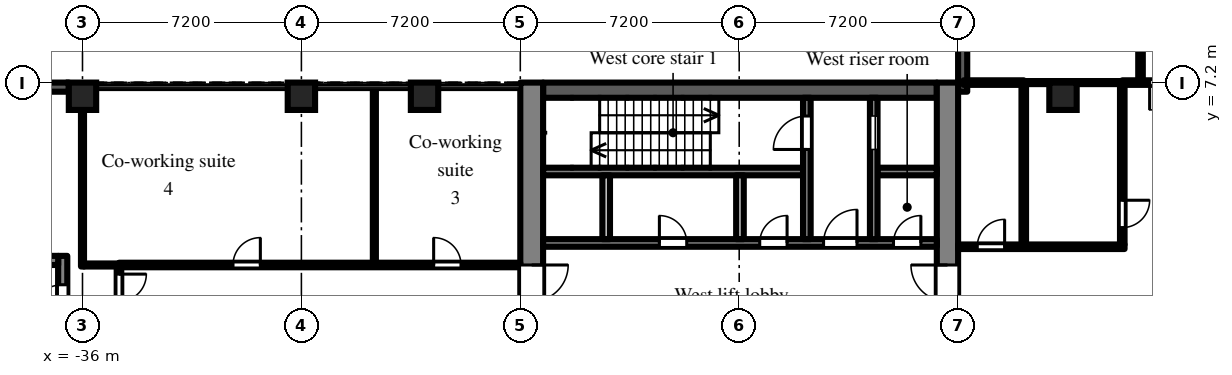
"""IFC4 building model, lengths in metres.
Left out: names, types, materials, properties, quantities, classifications, styles, units other than length and angle.
Written with IfcOpenShell. Run it as: python <this file> out.ifc"""

import sys

from ifc_helpers import new_model, si_unit, direction, frame, frame_2d, origin, origin_2d, place, context, subcontext, project, spatial, rectangle, extrude, element, fill, save


model = new_model("IFC4")
c1 = context("Model", 3, precision=1e-05, world=origin(), true_north=direction((0.0, 1.0)))
c2 = subcontext(c1, "Body", "Model", "MODEL_VIEW")
j1 = project(units=[si_unit("LENGTHUNIT", "METRE"), si_unit("PLANEANGLEUNIT", "RADIAN")], contexts=[c1])
p1 = place(None, origin())
s1 = spatial("IfcSite", under=j1, at=p1, CompositionType="ELEMENT")
p2 = place(p1, origin())
s2 = spatial("IfcBuilding", under=s1, at=p2, CompositionType="ELEMENT")
p3 = place(p2, frame((0.0, 0.0, 7.2)))
s3 = spatial("IfcBuildingStorey", under=s2, at=p3, CompositionType="ELEMENT", Elevation=7.2)
for number, where, z_axis, x_axis in (
    (1, (-36.0, 6.75, 0.0), (0.0, 0.0, 1.0), (1.0, 0.0, 0.0)),
    (2, (-28.8, 6.75, 0.0), (0.0, 0.0, 1.0), (1.0, 0.0, 0.0)),
    (3, (-24.75, 6.75, 0.0), (0.0, 0.0, 1.0), (1.0, 0.0, 0.0)),
    (4, (-3.75, 6.75, 0.0), (0.0, 0.0, 1.0), (1.0, 0.0, 0.0)),
):
    element("IfcColumn", number, at=place(p3, frame(where, z_axis=z_axis, x_axis=x_axis)), inside=s3, PredefinedType="COLUMN", context=c2, shape_type="SweptSolid", body=[
        extrude(rectangle(XDim=0.9, YDim=0.9, at=origin_2d()), origin(), (0.0, 0.0, 1.0), 4.5),
    ])
p4 = place(p3, frame((-7.05, 14.4, 0.0), z_axis=(0.0, 0.0, 1.0), x_axis=(0.0, -1.0, 0.0)))
e5 = element("IfcWall", 5, at=p4, inside=s3, PredefinedType="SOLIDWALL", context=c2, shape_type="SweptSolid", body=[
    extrude(rectangle(XDim=7.5, YDim=0.3, at=frame_2d((3.75, 0.0))), origin(), (0.0, 0.0, 1.0), 4.075),
])
p5 = place(p4, frame((0.15, 0.0, 0.0)))
e6 = element("IfcOpeningElement", 6, at=p5, cuts=e5, PredefinedType="OPENING", context=c2, shape_type="SweptSolid", body=[
    extrude(rectangle(XDim=1.3, YDim=2.1, at=frame_2d((0.65, 1.05))), frame((0.0, 0.16, 0.0), z_axis=(0.0, -1.0, 0.0), x_axis=(1.0, 0.0, 0.0)), (0.0, 0.0, 1.0), 0.32),
])
p6 = place(p3, frame((-36.45, 7.05, 0.0), z_axis=(0.0, 0.0, 1.0), x_axis=(-1.0, 0.0, 0.0)))
e7 = element("IfcWall", 7, at=p6, inside=s3, PredefinedType="SOLIDWALL", context=c2, shape_type="SweptSolid", body=[
    extrude(rectangle(XDim=2.25, YDim=0.3, at=frame_2d((1.125, 0.0))), origin(), (0.0, 0.0, 1.0), 3.6),
])
p7 = place(p3, frame((-7.55, -7.2, 0.0), z_axis=(0.0, 0.0, 1.0), x_axis=(0.0, 1.0, 0.0)))
e8 = element("IfcWall", 8, at=p7, inside=s3, PredefinedType="SHEAR", context=c2, shape_type="SweptSolid", body=[
    extrude(rectangle(XDim=14.4, YDim=0.7, at=frame_2d((7.2, 0.0))), origin(), (0.0, 0.0, 1.0), 4.075),
])
p8 = place(p7, frame((6.0, 0.0, 0.0)))
e9 = element("IfcOpeningElement", 9, at=p8, cuts=e8, PredefinedType="OPENING", context=c2, shape_type="SweptSolid", body=[
    extrude(rectangle(XDim=2.4, YDim=2.2, at=frame_2d((1.2, 1.1))), frame((0.0, 0.36, 0.0), z_axis=(0.0, -1.0, 0.0), x_axis=(1.0, 0.0, 0.0)), (0.0, 0.0, 1.0), 0.72),
])
p9 = place(p3, frame((-21.225, -7.2, 0.0), z_axis=(0.0, 0.0, 1.0), x_axis=(0.0, 1.0, 0.0)))
e10 = element("IfcWall", 10, at=p9, inside=s3, PredefinedType="SHEAR", context=c2, shape_type="SweptSolid", body=[
    extrude(rectangle(XDim=14.4, YDim=0.75, at=frame_2d((7.2, 0.0))), origin(), (0.0, 0.0, 1.0), 4.075),
])
p10 = place(p9, frame((6.0, 0.0, 0.0)))
e11 = element("IfcOpeningElement", 11, at=p10, cuts=e10, PredefinedType="OPENING", context=c2, shape_type="SweptSolid", body=[
    extrude(rectangle(XDim=2.4, YDim=2.2, at=frame_2d((1.2, 1.1))), frame((0.0, 0.385, 0.0), z_axis=(0.0, -1.0, 0.0), x_axis=(1.0, 0.0, 0.0)), (0.0, 0.0, 1.0), 0.77),
])
p11 = place(p3, frame((-7.9, 6.95, 0.0), z_axis=(0.0, 0.0, 1.0), x_axis=(-1.0, 0.0, 0.0)))
e12 = element("IfcWall", 12, at=p11, inside=s3, PredefinedType="SHEAR", context=c2, shape_type="SweptSolid", body=[
    extrude(rectangle(XDim=12.95, YDim=0.5, at=frame_2d((6.475, 0.0))), origin(), (0.0, 0.0, 1.0), 4.075),
])
p12 = place(p3, frame((-7.9, 1.925, 0.0), z_axis=(0.0, 0.0, 1.0), x_axis=(-1.0, 0.0, 0.0)))
e13 = element("IfcWall", 13, at=p12, inside=s3, PredefinedType="SHEAR", context=c2, shape_type="SweptSolid", body=[
    extrude(rectangle(XDim=12.95, YDim=0.25, at=frame_2d((6.475, 0.0))), origin(), (0.0, 0.0, 1.0), 4.075),
])
p13 = place(p12, frame((0.525, 0.0, 0.0)))
e14 = element("IfcOpeningElement", 14, at=p13, cuts=e13, PredefinedType="OPENING", context=c2, shape_type="SweptSolid", body=[
    extrude(rectangle(XDim=0.9, YDim=2.1, at=frame_2d((0.45, 1.05))), frame((0.0, 0.135, 0.0), z_axis=(0.0, -1.0, 0.0), x_axis=(1.0, 0.0, 0.0)), (0.0, 0.0, 1.0), 0.27),
])
p14 = place(p12, frame((2.625, 0.0, 0.0)))
e15 = element("IfcOpeningElement", 15, at=p14, cuts=e13, PredefinedType="OPENING", context=c2, shape_type="SweptSolid", body=[
    extrude(rectangle(XDim=1.1, YDim=2.1, at=frame_2d((0.55, 1.05))), frame((0.0, 0.135, 0.0), z_axis=(0.0, -1.0, 0.0), x_axis=(1.0, 0.0, 0.0)), (0.0, 0.0, 1.0), 0.27),
])
p15 = place(p12, frame((4.925, 0.0, 0.0)))
e16 = element("IfcOpeningElement", 16, at=p15, cuts=e13, PredefinedType="OPENING", context=c2, shape_type="SweptSolid", body=[
    extrude(rectangle(XDim=0.9, YDim=2.1, at=frame_2d((0.45, 1.05))), frame((0.0, 0.135, 0.0), z_axis=(0.0, -1.0, 0.0), x_axis=(1.0, 0.0, 0.0)), (0.0, 0.0, 1.0), 0.27),
])
p16 = place(p12, frame((8.225, 0.0, 0.0)))
e17 = element("IfcOpeningElement", 17, at=p16, cuts=e13, PredefinedType="OPENING", context=c2, shape_type="SweptSolid", body=[
    extrude(rectangle(XDim=0.9, YDim=2.1, at=frame_2d((0.45, 1.05))), frame((0.0, 0.135, 0.0), z_axis=(0.0, -1.0, 0.0), x_axis=(1.0, 0.0, 0.0)), (0.0, 0.0, 1.0), 0.27),
])
p17 = place(p3, frame((-7.9, 4.275, 0.0), z_axis=(0.0, 0.0, 1.0), x_axis=(-1.0, 0.0, 0.0)))
e18 = element("IfcWall", 18, at=p17, inside=s3, PredefinedType="SHEAR", context=c2, shape_type="SweptSolid", body=[
    extrude(rectangle(XDim=1.95, YDim=0.25, at=frame_2d((0.975, 0.0))), origin(), (0.0, 0.0, 1.0), 4.075),
])
p18 = place(p3, frame((-12.3, 4.275, 0.0), z_axis=(0.0, 0.0, 1.0), x_axis=(-1.0, 0.0, 0.0)))
e19 = element("IfcWall", 19, at=p18, inside=s3, PredefinedType="SHEAR", context=c2, shape_type="SweptSolid", body=[
    extrude(rectangle(XDim=8.55, YDim=0.25, at=frame_2d((4.275, 0.0))), origin(), (0.0, 0.0, 1.0), 4.075),
])
p19 = place(p3, frame((-9.975, 2.05, 0.0), z_axis=(0.0, 0.0, 1.0), x_axis=(0.0, 1.0, 0.0)))
e20 = element("IfcWall", 20, at=p19, inside=s3, PredefinedType="SHEAR", context=c2, shape_type="SweptSolid", body=[
    extrude(rectangle(XDim=4.65, YDim=0.25, at=frame_2d((2.325, 0.0))), origin(), (0.0, 0.0, 1.0), 4.075),
])
p20 = place(p19, frame((2.95, 0.0, 0.0)))
e21 = element("IfcOpeningElement", 21, at=p20, cuts=e20, PredefinedType="OPENING", context=c2, shape_type="SweptSolid", body=[
    extrude(rectangle(XDim=1.1, YDim=2.1, at=frame_2d((0.55, 1.05))), frame((0.0, 0.135, 0.0), z_axis=(0.0, -1.0, 0.0), x_axis=(1.0, 0.0, 0.0)), (0.0, 0.0, 1.0), 0.27),
])
p21 = place(p3, frame((-12.175, 2.05, 0.0), z_axis=(0.0, 0.0, 1.0), x_axis=(0.0, 1.0, 0.0)))
e22 = element("IfcWall", 22, at=p21, inside=s3, PredefinedType="SHEAR", context=c2, shape_type="SweptSolid", body=[
    extrude(rectangle(XDim=4.65, YDim=0.25, at=frame_2d((2.325, 0.0))), origin(), (0.0, 0.0, 1.0), 4.075),
])
p22 = place(p21, frame((2.95, 0.0, 0.0)))
e23 = element("IfcOpeningElement", 23, at=p22, cuts=e22, PredefinedType="OPENING", context=c2, shape_type="SweptSolid", body=[
    extrude(rectangle(XDim=1.1, YDim=2.1, at=frame_2d((0.55, 1.05))), frame((0.0, 0.135, 0.0), z_axis=(0.0, -1.0, 0.0), x_axis=(1.0, 0.0, 0.0)), (0.0, 0.0, 1.0), 0.27),
])
for number, where, z_axis, x_axis in (
    (24, (-14.375, 2.05, 0.0), (0.0, 0.0, 1.0), (0.0, 1.0, 0.0)),
    (25, (-18.775, 2.05, 0.0), (0.0, 0.0, 1.0), (0.0, 1.0, 0.0)),
):
    element("IfcWall", number, at=place(p3, frame(where, z_axis=z_axis, x_axis=x_axis)), inside=s3, PredefinedType="PARTITIONING", context=c2, shape_type="SweptSolid", body=[
        extrude(rectangle(XDim=2.1, YDim=0.25, at=frame_2d((1.05, 0.0))), origin(), (0.0, 0.0, 1.0), 4.075),
    ])
p23 = place(p3, frame((-36.65, -1.5, 0.0), z_axis=(0.0, 0.0, 1.0), x_axis=(0.0, 1.0, 0.0)))
e26 = element("IfcWall", 26, at=p23, inside=s3, PredefinedType="SHEAR", context=c2, shape_type="SweptSolid", body=[
    extrude(rectangle(XDim=3.0, YDim=0.3, at=frame_2d((1.5, 0.0))), origin(), (0.0, 0.0, 1.0), 4.075),
])
p24 = place(p23, frame((0.95, 0.0, 0.0)))
e27 = element("IfcOpeningElement", 27, at=p24, cuts=e26, PredefinedType="OPENING", context=c2, shape_type="SweptSolid", body=[
    extrude(rectangle(XDim=1.1, YDim=2.1, at=frame_2d((0.55, 1.05))), frame((0.0, 0.16, 0.0), z_axis=(0.0, -1.0, 0.0), x_axis=(1.0, 0.0, 0.0)), (0.0, 0.0, 1.0), 0.32),
])
p25 = place(p3, frame((-36.8, 1.35, 0.0), z_axis=(0.0, 0.0, 1.0), x_axis=(-1.0, 0.0, 0.0)))
e28 = element("IfcWall", 28, at=p25, inside=s3, PredefinedType="SHEAR", context=c2, shape_type="SweptSolid", body=[
    extrude(rectangle(XDim=5.8, YDim=0.3, at=frame_2d((2.9, 0.0))), origin(), (0.0, 0.0, 1.0), 4.075),
])
p26 = place(p3, frame((-36.0, 1.15, 0.0), z_axis=(0.0, 0.0, 1.0), x_axis=(0.0, 1.0, 0.0)))
e29 = element("IfcWall", 29, at=p26, inside=s3, PredefinedType="PARTITIONING", context=c2, shape_type="SweptSolid", body=[
    extrude(rectangle(XDim=5.75, YDim=0.1, at=frame_2d((2.875, 0.0))), origin(), (0.0, 0.0, 1.0), 4.075),
])
p27 = place(p3, frame((-35.95, 1.2, 0.0), z_axis=(0.0, 0.0, 1.0), x_axis=(1.0, 0.0, 0.0)))
e30 = element("IfcWall", 30, at=p27, inside=s3, PredefinedType="PARTITIONING", context=c2, shape_type="SweptSolid", body=[
    extrude(rectangle(XDim=1.15, YDim=0.1, at=frame_2d((0.575, 0.0))), origin(), (0.0, 0.0, 1.0), 4.075),
])
p28 = place(p3, frame((-34.8, -1.125, 0.0), z_axis=(0.0, 0.0, 1.0), x_axis=(0.0, 1.0, 0.0)))
e31 = element("IfcWall", 31, at=p28, inside=s3, PredefinedType="PARTITIONING", context=c2, shape_type="SweptSolid", body=[
    extrude(rectangle(XDim=2.25, YDim=0.15, at=frame_2d((1.125, 0.0))), origin(), (0.0, 0.0, 1.0), 4.075),
])
p29 = place(p28, frame((0.225, 0.0, 0.0)))
e32 = element("IfcOpeningElement", 32, at=p29, cuts=e31, PredefinedType="OPENING", context=c2, shape_type="SweptSolid", body=[
    extrude(rectangle(XDim=1.8, YDim=2.1, at=frame_2d((0.9, 1.05))), frame((0.0, 0.085, 0.0), z_axis=(0.0, -1.0, 0.0), x_axis=(1.0, 0.0, 0.0)), (0.0, 0.0, 1.0), 0.17),
])
p30 = place(p3, frame((-34.8, 1.2, 0.0), z_axis=(0.0, 0.0, 1.0), x_axis=(1.0, 0.0, 0.0)))
e33 = element("IfcWall", 33, at=p30, inside=s3, PredefinedType="PARTITIONING", context=c2, shape_type="SweptSolid", body=[
    extrude(rectangle(XDim=13.2, YDim=0.15, at=frame_2d((6.6, 0.0))), origin(), (0.0, 0.0, 1.0), 4.075),
])
p31 = place(p30, frame((10.35, 0.0, 0.0)))
e34 = element("IfcOpeningElement", 34, at=p31, cuts=e33, PredefinedType="OPENING", context=c2, shape_type="SweptSolid", body=[
    extrude(rectangle(XDim=0.9, YDim=2.1, at=frame_2d((0.45, 1.05))), frame((0.0, 0.085, 0.0), z_axis=(0.0, -1.0, 0.0), x_axis=(1.0, 0.0, 0.0)), (0.0, 0.0, 1.0), 0.17),
])
p32 = place(p30, frame((3.75, 0.0, 0.0)))
e35 = element("IfcOpeningElement", 35, at=p32, cuts=e33, PredefinedType="OPENING", context=c2, shape_type="SweptSolid", body=[
    extrude(rectangle(XDim=0.9, YDim=2.1, at=frame_2d((0.45, 1.05))), frame((0.0, 0.085, 0.0), z_axis=(0.0, -1.0, 0.0), x_axis=(1.0, 0.0, 0.0)), (0.0, 0.0, 1.0), 0.17),
])
p33 = place(p3, frame((-26.4, 1.275, 0.0), z_axis=(0.0, 0.0, 1.0), x_axis=(0.0, 1.0, 0.0)))
e36 = element("IfcWall", 36, at=p33, inside=s3, PredefinedType="PARTITIONING", context=c2, shape_type="SweptSolid", body=[
    extrude(rectangle(XDim=5.745, YDim=0.1, at=frame_2d((2.873, 0.0))), origin(), (0.0, 0.0, 1.0), 4.075),
])
p34 = place(p3, frame((-7.2, 1.8, 0.0), z_axis=(0.0, 0.0, 1.0), x_axis=(1.0, 0.0, 0.0)))
e37 = element("IfcWall", 37, at=p34, inside=s3, PredefinedType="PARTITIONING", context=c2, shape_type="SweptSolid", body=[
    extrude(rectangle(XDim=5.475, YDim=0.15, at=frame_2d((2.737, 0.0))), origin(), (0.0, 0.0, 1.0), 4.075),
])
p35 = place(p34, frame((0.63, 0.0, 0.0)))
e38 = element("IfcOpeningElement", 38, at=p35, cuts=e37, PredefinedType="OPENING", context=c2, shape_type="SweptSolid", body=[
    extrude(rectangle(XDim=0.9, YDim=2.1, at=frame_2d((0.45, 1.05))), frame((0.0, 0.085, 0.0), z_axis=(0.0, -1.0, 0.0), x_axis=(1.0, 0.0, 0.0)), (0.0, 0.0, 1.0), 0.17),
])
p36 = place(p3, frame((-7.02, 7.2, 0.0), z_axis=(0.0, 0.0, 1.0), x_axis=(1.0, 0.0, 0.0)))
e39 = element("IfcWall", 39, at=p36, inside=s3, PredefinedType="PARTITIONING", context=c2, shape_type="SweptSolid", body=[
    extrude(rectangle(XDim=1.98, YDim=0.15, at=frame_2d((0.99, 0.0))), origin(), (0.0, 0.0, 1.0), 3.6),
])
p37 = place(p3, frame((-5.04, 1.875, 0.0), z_axis=(0.0, 0.0, 1.0), x_axis=(0.0, 1.0, 0.0)))
e40 = element("IfcWall", 40, at=p37, inside=s3, PredefinedType="PARTITIONING", context=c2, shape_type="SweptSolid", body=[
    extrude(rectangle(XDim=5.25, YDim=0.15, at=frame_2d((2.625, 0.0))), origin(), (0.0, 0.0, 1.0), 4.075),
])
p38 = place(p3, frame((-5.04, 7.2, 0.0), z_axis=(0.0, 0.0, 1.0), x_axis=(1.0, 0.0, 0.0)))
e41 = element("IfcWall", 41, at=p38, inside=s3, PredefinedType="PARTITIONING", context=c2, shape_type="SweptSolid", body=[
    extrude(rectangle(XDim=1.29, YDim=0.1, at=frame_2d((0.645, 0.0))), origin(), (0.0, 0.0, 1.0), 3.6),
])
p39 = place(p3, frame((-1.8, 1.875, 0.0), z_axis=(0.0, 0.0, 1.0), x_axis=(0.0, 1.0, 0.0)))
e42 = element("IfcWall", 42, at=p39, inside=s3, PredefinedType="PARTITIONING", context=c2, shape_type="SweptSolid", body=[
    extrude(rectangle(XDim=5.25, YDim=0.15, at=frame_2d((2.625, 0.0))), origin(), (0.0, 0.0, 1.0), 4.075),
])
p40 = place(p39, frame((0.555, 0.0, 0.0)))
e43 = element("IfcOpeningElement", 43, at=p40, cuts=e42, PredefinedType="OPENING", context=c2, shape_type="SweptSolid", body=[
    extrude(rectangle(XDim=0.9, YDim=2.1, at=frame_2d((0.45, 1.05))), frame((0.0, 0.085, 0.0), z_axis=(0.0, -1.0, 0.0), x_axis=(1.0, 0.0, 0.0)), (0.0, 0.0, 1.0), 0.17),
])
p41 = place(p3, frame((-1.8, 7.2, 0.0), z_axis=(0.0, 0.0, 1.0), x_axis=(1.0, 0.0, 0.0)))
e44 = element("IfcWall", 44, at=p41, inside=s3, PredefinedType="PARTITIONING", context=c2, shape_type="SweptSolid", body=[
    extrude(rectangle(XDim=3.6, YDim=0.15, at=frame_2d((1.8, 0.0))), origin(), (0.0, 0.0, 1.0), 4.075),
])
p42 = place(p41, frame((0.9, 0.0, 0.0)))
e45 = element("IfcOpeningElement", 45, at=p42, cuts=e44, PredefinedType="OPENING", context=c2, shape_type="SweptSolid", body=[
    extrude(rectangle(XDim=1.8, YDim=2.1, at=frame_2d((0.9, 1.05))), frame((0.0, 0.085, 0.0), z_axis=(0.0, -1.0, 0.0), x_axis=(1.0, 0.0, 0.0)), (0.0, 0.0, 1.0), 0.17),
])
p43 = place(p3, frame((-1.2, 7.275, 0.0), z_axis=(0.0, 0.0, 1.0), x_axis=(0.0, 1.0, 0.0)))
e46 = element("IfcWall", 46, at=p43, inside=s3, PredefinedType="PARTITIONING", context=c2, shape_type="SweptSolid", body=[
    extrude(rectangle(XDim=29.225, YDim=0.15, at=frame_2d((14.613, 0.0))), origin(), (0.0, 0.0, 1.0), 4.075),
])
p44 = place(p43, frame((6.675, 0.0, 0.0)))
e47 = element("IfcOpeningElement", 47, at=p44, cuts=e46, PredefinedType="OPENING", context=c2, shape_type="SweptSolid", body=[
    extrude(rectangle(XDim=0.9, YDim=2.1, at=frame_2d((0.45, 1.05))), frame((0.0, 0.085, 0.0), z_axis=(0.0, -1.0, 0.0), x_axis=(1.0, 0.0, 0.0)), (0.0, 0.0, 1.0), 0.17),
])
p45 = place(p43, frame((18.675, 0.0, 0.0)))
e48 = element("IfcOpeningElement", 48, at=p45, cuts=e46, PredefinedType="OPENING", context=c2, shape_type="SweptSolid", body=[
    extrude(rectangle(XDim=0.9, YDim=2.1, at=frame_2d((0.45, 1.05))), frame((0.0, 0.085, 0.0), z_axis=(0.0, -1.0, 0.0), x_axis=(1.0, 0.0, 0.0)), (0.0, 0.0, 1.0), 0.17),
])
p46 = place(p43, frame((26.125, 0.0, 0.0)))
e49 = element("IfcOpeningElement", 49, at=p46, cuts=e46, PredefinedType="OPENING", context=c2, shape_type="SweptSolid", body=[
    extrude(rectangle(XDim=0.9, YDim=2.1, at=frame_2d((0.45, 1.05))), frame((0.0, 0.085, 0.0), z_axis=(0.0, -1.0, 0.0), x_axis=(1.0, 0.0, 0.0)), (0.0, 0.0, 1.0), 0.17),
])
p47 = place(p3, frame((-3.75, 7.2, 0.0), z_axis=(0.0, 0.0, 1.0), x_axis=(1.0, 0.0, 0.0)))
e50 = element("IfcWall", 50, at=p47, inside=s3, PredefinedType="PARTITIONING", context=c2, shape_type="SweptSolid", body=[
    extrude(rectangle(XDim=1.95, YDim=0.1, at=frame_2d((0.975, 0.0))), origin(), (0.0, 0.0, 1.0), 4.075),
])
p48 = place(p20, origin())
e51 = element("IfcDoor", 51, at=p48, inside=s3, OperationType="SLIDING_TO_LEFT", PredefinedType="DOOR", context=c2, shape_type="SweptSolid", body=[
    extrude(rectangle(XDim=1.1, YDim=2.1, at=frame_2d((0.55, 1.05))), frame((0.0, 0.025, 0.0), z_axis=(0.0, -1.0, 0.0), x_axis=(1.0, 0.0, 0.0)), (0.0, 0.0, 1.0), 0.05),
])
fill(e21, e51)
p49 = place(p22, origin())
e52 = element("IfcDoor", 52, at=p49, inside=s3, OperationType="SINGLE_SWING_LEFT", PredefinedType="DOOR", context=c2, shape_type="SweptSolid", body=[
    extrude(rectangle(XDim=1.1, YDim=2.1, at=frame_2d((0.55, 1.05))), frame((0.0, 0.025, 0.0), z_axis=(0.0, -1.0, 0.0), x_axis=(1.0, 0.0, 0.0)), (0.0, 0.0, 1.0), 0.05),
])
fill(e23, e52)
p50 = place(p13, frame((0.9, 0.0, 0.0), z_axis=(0.0, 0.0, 1.0), x_axis=(-1.0, 0.0, 0.0)))
e53 = element("IfcDoor", 53, at=p50, inside=s3, OperationType="SINGLE_SWING_RIGHT", PredefinedType="DOOR", context=c2, shape_type="SweptSolid", body=[
    extrude(rectangle(XDim=0.9, YDim=2.1, at=frame_2d((0.45, 1.05))), frame((0.0, 0.025, 0.0), z_axis=(0.0, -1.0, 0.0), x_axis=(1.0, 0.0, 0.0)), (0.0, 0.0, 1.0), 0.05),
])
fill(e14, e53)
p51 = place(p14, frame((1.1, 0.0, 0.0), z_axis=(0.0, 0.0, 1.0), x_axis=(-1.0, 0.0, 0.0)))
e54 = element("IfcDoor", 54, at=p51, inside=s3, OperationType="SINGLE_SWING_RIGHT", PredefinedType="DOOR", context=c2, shape_type="SweptSolid", body=[
    extrude(rectangle(XDim=1.1, YDim=2.1, at=frame_2d((0.55, 1.05))), frame((0.0, 0.025, 0.0), z_axis=(0.0, -1.0, 0.0), x_axis=(1.0, 0.0, 0.0)), (0.0, 0.0, 1.0), 0.05),
])
fill(e15, e54)
p52 = place(p8, origin())
e55 = element("IfcDoor", 55, at=p52, inside=s3, OperationType="DOUBLE_DOOR_DOUBLE_SWING", PredefinedType="DOOR", context=c2, shape_type="SweptSolid", body=[
    extrude(rectangle(XDim=2.4, YDim=2.2, at=frame_2d((1.2, 1.1))), frame((0.0, 0.025, 0.0), z_axis=(0.0, -1.0, 0.0), x_axis=(1.0, 0.0, 0.0)), (0.0, 0.0, 1.0), 0.05),
])
fill(e9, e55)
p53 = place(p10, frame((2.4, 0.0, 0.0), z_axis=(0.0, 0.0, 1.0), x_axis=(-1.0, 0.0, 0.0)))
e56 = element("IfcDoor", 56, at=p53, inside=s3, OperationType="DOUBLE_DOOR_DOUBLE_SWING", PredefinedType="DOOR", context=c2, shape_type="SweptSolid", body=[
    extrude(rectangle(XDim=2.4, YDim=2.2, at=frame_2d((1.2, 1.1))), frame((0.0, 0.025, 0.0), z_axis=(0.0, -1.0, 0.0), x_axis=(1.0, 0.0, 0.0)), (0.0, 0.0, 1.0), 0.05),
])
fill(e11, e56)
p54 = place(p15, frame((0.9, 0.0, 0.0), z_axis=(0.0, 0.0, 1.0), x_axis=(-1.0, 0.0, 0.0)))
e57 = element("IfcDoor", 57, at=p54, inside=s3, OperationType="SINGLE_SWING_RIGHT", PredefinedType="DOOR", context=c2, shape_type="SweptSolid", body=[
    extrude(rectangle(XDim=0.9, YDim=2.1, at=frame_2d((0.45, 1.05))), frame((0.0, 0.025, 0.0), z_axis=(0.0, -1.0, 0.0), x_axis=(1.0, 0.0, 0.0)), (0.0, 0.0, 1.0), 0.05),
])
fill(e16, e57)
p55 = place(p16, frame((0.9, 0.0, 0.0), z_axis=(0.0, 0.0, 1.0), x_axis=(-1.0, 0.0, 0.0)))
e58 = element("IfcDoor", 58, at=p55, inside=s3, OperationType="SINGLE_SWING_LEFT", PredefinedType="DOOR", context=c2, shape_type="SweptSolid", body=[
    extrude(rectangle(XDim=0.9, YDim=2.1, at=frame_2d((0.45, 1.05))), frame((0.0, 0.025, 0.0), z_axis=(0.0, -1.0, 0.0), x_axis=(1.0, 0.0, 0.0)), (0.0, 0.0, 1.0), 0.05),
])
fill(e17, e58)
p56 = place(p24, origin())
e59 = element("IfcDoor", 59, at=p56, inside=s3, OperationType="SINGLE_SWING_LEFT", PredefinedType="DOOR", context=c2, shape_type="SweptSolid", body=[
    extrude(rectangle(XDim=1.1, YDim=2.1, at=frame_2d((0.55, 1.05))), frame((0.0, 0.025, 0.0), z_axis=(0.0, -1.0, 0.0), x_axis=(1.0, 0.0, 0.0)), (0.0, 0.0, 1.0), 0.05),
])
fill(e27, e59)
p57 = place(p40, frame((0.9, 0.0, 0.0), z_axis=(0.0, 0.0, 1.0), x_axis=(-1.0, 0.0, 0.0)))
e60 = element("IfcDoor", 60, at=p57, inside=s3, OperationType="SINGLE_SWING_LEFT", PredefinedType="DOOR", context=c2, shape_type="SweptSolid", body=[
    extrude(rectangle(XDim=0.9, YDim=2.1, at=frame_2d((0.45, 1.05))), frame((0.0, 0.025, 0.0), z_axis=(0.0, -1.0, 0.0), x_axis=(1.0, 0.0, 0.0)), (0.0, 0.0, 1.0), 0.05),
])
fill(e43, e60)
p58 = place(p35, origin())
e61 = element("IfcDoor", 61, at=p58, inside=s3, OperationType="SINGLE_SWING_RIGHT", PredefinedType="DOOR", context=c2, shape_type="SweptSolid", body=[
    extrude(rectangle(XDim=0.9, YDim=2.1, at=frame_2d((0.45, 1.05))), frame((0.0, 0.025, 0.0), z_axis=(0.0, -1.0, 0.0), x_axis=(1.0, 0.0, 0.0)), (0.0, 0.0, 1.0), 0.05),
])
fill(e38, e61)
p59 = place(p42, frame((1.8, 0.0, 0.0), z_axis=(0.0, 0.0, 1.0), x_axis=(-1.0, 0.0, 0.0)))
e62 = element("IfcDoor", 62, at=p59, inside=s3, OperationType="DOUBLE_DOOR_DOUBLE_SWING", PredefinedType="DOOR", context=c2, shape_type="SweptSolid", body=[
    extrude(rectangle(XDim=1.8, YDim=2.1, at=frame_2d((0.9, 1.05))), frame((0.0, 0.025, 0.0), z_axis=(0.0, -1.0, 0.0), x_axis=(1.0, 0.0, 0.0)), (0.0, 0.0, 1.0), 0.05),
])
fill(e45, e62)
p60 = place(p29, frame((1.8, 0.0, 0.0), z_axis=(0.0, 0.0, 1.0), x_axis=(-1.0, 0.0, 0.0)))
e63 = element("IfcDoor", 63, at=p60, inside=s3, OperationType="DOUBLE_DOOR_DOUBLE_SWING", PredefinedType="DOOR", context=c2, shape_type="SweptSolid", body=[
    extrude(rectangle(XDim=1.8, YDim=2.1, at=frame_2d((0.9, 1.05))), frame((0.0, 0.025, 0.0), z_axis=(0.0, -1.0, 0.0), x_axis=(1.0, 0.0, 0.0)), (0.0, 0.0, 1.0), 0.05),
])
fill(e32, e63)
p61 = place(p31, origin())
e64 = element("IfcDoor", 64, at=p61, inside=s3, OperationType="SINGLE_SWING_LEFT", PredefinedType="DOOR", context=c2, shape_type="SweptSolid", body=[
    extrude(rectangle(XDim=0.9, YDim=2.1, at=frame_2d((0.45, 1.05))), frame((0.0, 0.025, 0.0), z_axis=(0.0, -1.0, 0.0), x_axis=(1.0, 0.0, 0.0)), (0.0, 0.0, 1.0), 0.05),
])
fill(e34, e64)
p62 = place(p32, origin())
e65 = element("IfcDoor", 65, at=p62, inside=s3, OperationType="SINGLE_SWING_RIGHT", PredefinedType="DOOR", context=c2, shape_type="SweptSolid", body=[
    extrude(rectangle(XDim=0.9, YDim=2.1, at=frame_2d((0.45, 1.05))), frame((0.0, 0.025, 0.0), z_axis=(0.0, -1.0, 0.0), x_axis=(1.0, 0.0, 0.0)), (0.0, 0.0, 1.0), 0.05),
])
fill(e35, e65)
save(model, sys.argv[1])
